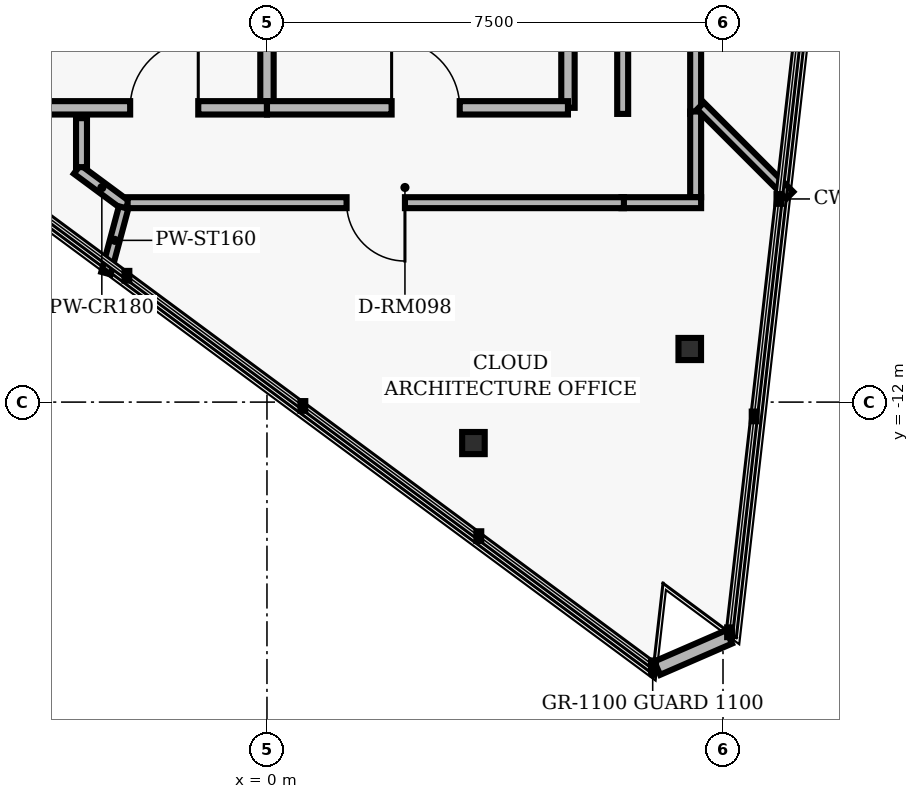
"""IFC4 building model, lengths in metres.
Left out: names, types, materials, properties, quantities, classifications, styles, units other than length and angle.
Written with IfcOpenShell. Run it as: python <this file> out.ifc"""

import sys

from ifc_helpers import new_model, si_unit, direction, frame, frame_2d, origin, origin_2d, place, context, subcontext, project, spatial, rectangle, i_section, extrude, element, fill, save


model = new_model("IFC4")
c1 = context("Model", 3, precision=1e-05, world=origin(), true_north=direction((0.0, 1.0)))
c2 = subcontext(c1, "Body", "Model", "MODEL_VIEW")
j1 = project(units=[si_unit("LENGTHUNIT", "METRE"), si_unit("PLANEANGLEUNIT", "RADIAN")], contexts=[c1])
p1 = place(None, origin())
s1 = spatial("IfcSite", under=j1, at=p1, CompositionType="ELEMENT")
p2 = place(p1, origin())
s2 = spatial("IfcBuilding", under=s1, at=p2, CompositionType="ELEMENT")
p3 = place(p2, frame((0.0, 0.0, 246.24)))
s3 = spatial("IfcBuildingStorey", under=s2, at=p3, CompositionType="ELEMENT", Elevation=246.24)
for number, where, z_axis, x_axis in (
    (1, (6.953, -11.127, 0.0), (0.0, 0.0, 1.0), (1.0, 0.0, 0.0)),
    (2, (3.396, -12.674, 0.0), (0.0, 0.0, 1.0), (1.0, 0.0, 0.0)),
):
    element("IfcColumn", number, at=place(p3, frame(where, z_axis=z_axis, x_axis=x_axis)), inside=s3, PredefinedType="COLUMN", context=c2, shape_type="SweptSolid", body=[
        extrude(i_section(OverallWidth=0.371, OverallDepth=0.364, WebThickness=0.013, FlangeThickness=0.022, FilletRadius=0.015, at=origin_2d()), origin(), (0.0, 0.0, 1.0), 2.88),
    ])
p4 = place(p3, frame((6.418, -16.376, 0.0), z_axis=(0.0, 0.0, 1.0), x_axis=(0.917064030228, 0.398739970986, 0.0)))
e3 = element("IfcWall", 3, at=p4, inside=s3, PredefinedType="PARAPET", context=c2, shape_type="SweptSolid", body=[
    extrude(rectangle(XDim=1.288, YDim=0.24, at=frame_2d((0.644, 0.0))), origin(), (0.0, 0.0, 1.0), 2.168),
])
p5 = place(p3, frame((4.95, -7.16, 0.0), z_axis=(0.0, 0.0, 1.0), x_axis=(0.0, 1.0, 0.0)))
e4 = element("IfcWall", 4, at=p5, inside=s3, PredefinedType="PARTITIONING", context=c2, shape_type="SweptSolid", body=[
    extrude(rectangle(XDim=2.71, YDim=0.22, at=frame_2d((1.355, 0.0))), origin(), (0.0, 0.0, 1.0), 2.623),
])
p6 = place(p3, frame((0.0, -7.16, 0.0), z_axis=(0.0, 0.0, 1.0), x_axis=(0.0, 1.0, 0.0)))
e5 = element("IfcWall", 5, at=p6, inside=s3, PredefinedType="PARTITIONING", context=c2, shape_type="SweptSolid", body=[
    extrude(rectangle(XDim=2.81, YDim=0.22, at=frame_2d((1.405, 0.0))), origin(), (0.0, 0.0, 1.0), 2.623),
])
p7 = place(p3, frame((-5.4, -7.16, 0.0), z_axis=(0.0, 0.0, 1.0), x_axis=(1.0, 0.0, 0.0)))
e6 = element("IfcWall", 6, at=p7, inside=s3, PredefinedType="PARTITIONING", context=c2, shape_type="SweptSolid", body=[
    extrude(rectangle(XDim=5.4, YDim=0.22, at=frame_2d((2.7, 0.0))), origin(), (0.0, 0.0, 1.0), 2.623),
])
p8 = place(p7, frame((3.15, 0.0, 0.0)))
e7 = element("IfcOpeningElement", 7, at=p8, cuts=e6, PredefinedType="OPENING", context=c2, shape_type="SweptSolid", body=[
    extrude(rectangle(XDim=1.12, YDim=2.02, at=frame_2d((0.56, 1.01))), frame((0.0, 0.12, 0.0), z_axis=(0.0, -1.0, 0.0), x_axis=(1.0, 0.0, 0.0)), (0.0, 0.0, 1.0), 0.24),
])
p9 = place(p3, frame((0.0, -7.16, 0.0), z_axis=(0.0, 0.0, 1.0), x_axis=(1.0, 0.0, 0.0)))
e8 = element("IfcWall", 8, at=p9, inside=s3, PredefinedType="PARTITIONING", context=c2, shape_type="SweptSolid", body=[
    extrude(rectangle(XDim=4.95, YDim=0.22, at=frame_2d((2.475, 0.0))), origin(), (0.0, 0.0, 1.0), 2.623),
])
p10 = place(p9, frame((2.05, 0.0, 0.0)))
e9 = element("IfcOpeningElement", 9, at=p10, cuts=e8, PredefinedType="OPENING", context=c2, shape_type="SweptSolid", body=[
    extrude(rectangle(XDim=1.12, YDim=2.02, at=frame_2d((0.56, 1.01))), frame((0.0, 0.12, 0.0), z_axis=(0.0, -1.0, 0.0), x_axis=(1.0, 0.0, 0.0)), (0.0, 0.0, 1.0), 0.24),
])
p11 = place(p3, frame((-2.309, -8.773, 0.0), z_axis=(0.0, 0.0, 1.0), x_axis=(-0.803864984235, 0.594811808155, 0.0)))
e10 = element("IfcWall", 10, at=p11, inside=s3, PredefinedType="PARTITIONING", context=c2, shape_type="SweptSolid", body=[
    extrude(rectangle(XDim=1.011, YDim=0.18, at=frame_2d((0.506, 0.0))), origin(), (0.0, 0.0, 1.0), 2.203),
])
p12 = place(p3, frame((-3.05, -8.135, 0.0), z_axis=(0.0, 0.0, 1.0), x_axis=(0.0, 1.0, 0.0)))
e11 = element("IfcWall", 11, at=p12, inside=s3, PredefinedType="PARTITIONING", context=c2, shape_type="SweptSolid", body=[
    extrude(rectangle(XDim=0.805, YDim=0.18, at=frame_2d((0.403, 0.0))), origin(), (0.0, 0.0, 1.0), 2.623),
])
p13 = place(p3, frame((5.85, -7.26, 0.0), z_axis=(0.0, 0.0, 1.0), x_axis=(0.0, 1.0, 0.0)))
e12 = element("IfcWall", 12, at=p13, inside=s3, PredefinedType="PARTITIONING", context=c2, shape_type="SweptSolid", body=[
    extrude(rectangle(XDim=2.61, YDim=0.18, at=frame_2d((1.305, 0.0))), origin(), (0.0, 0.0, 1.0), 2.153),
])
p14 = place(p3, frame((7.05, 7.22, 0.0), z_axis=(0.0, 0.0, 1.0), x_axis=(0.0, -1.0, 0.0)))
e13 = element("IfcWall", 13, at=p14, inside=s3, PredefinedType="PARTITIONING", context=c2, shape_type="SweptSolid", body=[
    extrude(rectangle(XDim=14.48, YDim=0.18, at=frame_2d((7.24, 0.0))), origin(), (0.0, 0.0, 1.0), 2.203),
])
p15 = place(p14, frame((12.019, 0.0, 0.0)))
e14 = element("IfcOpeningElement", 14, at=p15, cuts=e13, PredefinedType="OPENING", context=c2, shape_type="SweptSolid", body=[
    extrude(rectangle(XDim=1.02, YDim=2.02, at=frame_2d((0.51, 1.01))), frame((0.0, 0.1, 0.0), z_axis=(0.0, -1.0, 0.0), x_axis=(1.0, 0.0, 0.0)), (0.0, 0.0, 1.0), 0.2),
])
p16 = place(p14, frame((0.3, 0.0, 0.0)))
e15 = element("IfcOpeningElement", 15, at=p16, cuts=e13, PredefinedType="OPENING", context=c2, shape_type="SweptSolid", body=[
    extrude(rectangle(XDim=0.96, YDim=2.02, at=frame_2d((0.48, 1.01))), frame((0.0, 0.1, 0.0), z_axis=(0.0, -1.0, 0.0), x_axis=(1.0, 0.0, 0.0)), (0.0, 0.0, 1.0), 0.2),
])
p17 = place(p3, frame((7.05, -7.22, 0.0), z_axis=(0.0, 0.0, 1.0), x_axis=(0.0, -1.0, 0.0)))
e16 = element("IfcWall", 16, at=p17, inside=s3, PredefinedType="PARTITIONING", context=c2, shape_type="SweptSolid", body=[
    extrude(rectangle(XDim=1.41, YDim=0.18, at=frame_2d((0.705, 0.0))), origin(), (0.0, 0.0, 1.0), 2.153),
])
p18 = place(p3, frame((7.14, -8.72, 0.0), z_axis=(0.0, 0.0, 1.0), x_axis=(-1.0, 0.0, 0.0)))
e17 = element("IfcWall", 17, at=p18, inside=s3, PredefinedType="PARTITIONING", context=c2, shape_type="SweptSolid", body=[
    extrude(rectangle(XDim=1.31, YDim=0.18, at=frame_2d((0.655, 0.0))), origin(), (0.0, 0.0, 1.0), 2.623),
])
p19 = place(p3, frame((5.87, -8.72, 0.0), z_axis=(0.0, 0.0, 1.0), x_axis=(-1.0, 0.0, 0.0)))
e18 = element("IfcWall", 18, at=p19, inside=s3, PredefinedType="PARTITIONING", context=c2, shape_type="SweptSolid", body=[
    extrude(rectangle(XDim=8.162, YDim=0.18, at=frame_2d((4.081, 0.0))), origin(), (0.0, 0.0, 1.0), 2.623),
])
p20 = place(p19, frame((3.601, 0.0, 0.0)))
e19 = element("IfcOpeningElement", 19, at=p20, cuts=e18, PredefinedType="OPENING", context=c2, shape_type="SweptSolid", body=[
    extrude(rectangle(XDim=0.96, YDim=2.02, at=frame_2d((0.48, 1.01))), frame((0.0, 0.1, 0.0), z_axis=(0.0, -1.0, 0.0), x_axis=(1.0, 0.0, 0.0)), (0.0, 0.0, 1.0), 0.2),
])
p21 = place(p3, frame((-2.358, -8.8, 0.0), z_axis=(0.0, 0.0, 1.0), x_axis=(-0.258899893442, -0.965904159415, 0.0)))
e20 = element("IfcWall", 20, at=p21, inside=s3, PredefinedType="PARTITIONING", context=c2, shape_type="SweptSolid", body=[
    extrude(rectangle(XDim=1.117, YDim=0.16, at=frame_2d((0.559, 0.0))), origin(), (0.0, 0.0, 1.0), 2.623),
])
p22 = place(p3, frame((7.13, -7.13, 0.0), z_axis=(0.0, 0.0, 1.0), x_axis=(0.707106781187, -0.707106781187, 0.0)))
e21 = element("IfcWall", 21, at=p22, inside=s3, PredefinedType="PARTITIONING", context=c2, shape_type="SweptSolid", body=[
    extrude(rectangle(XDim=2.076, YDim=0.16, at=frame_2d((1.038, 0.0))), origin(), (0.0, 0.0, 1.0), 2.623),
])
p23 = place(p8, origin())
e22 = element("IfcDoor", 22, at=p23, inside=s3, OperationType="SINGLE_SWING_RIGHT", PredefinedType="DOOR", context=c2, shape_type="SweptSolid", body=[
    extrude(rectangle(XDim=1.12, YDim=2.02, at=frame_2d((0.56, 1.01))), frame((0.0, 0.025, 0.0), z_axis=(0.0, -1.0, 0.0), x_axis=(1.0, 0.0, 0.0)), (0.0, 0.0, 1.0), 0.05),
])
fill(e7, e22)
p24 = place(p10, origin())
e23 = element("IfcDoor", 23, at=p24, inside=s3, OperationType="SINGLE_SWING_LEFT", PredefinedType="DOOR", context=c2, shape_type="SweptSolid", body=[
    extrude(rectangle(XDim=1.12, YDim=2.02, at=frame_2d((0.56, 1.01))), frame((0.0, 0.025, 0.0), z_axis=(0.0, -1.0, 0.0), x_axis=(1.0, 0.0, 0.0)), (0.0, 0.0, 1.0), 0.05),
])
fill(e9, e23)
p25 = place(p20, origin())
e24 = element("IfcDoor", 24, at=p25, inside=s3, OperationType="SINGLE_SWING_LEFT", PredefinedType="DOOR", context=c2, shape_type="SweptSolid", body=[
    extrude(rectangle(XDim=0.96, YDim=2.02, at=frame_2d((0.48, 1.01))), frame((0.0, 0.025, 0.0), z_axis=(0.0, -1.0, 0.0), x_axis=(1.0, 0.0, 0.0)), (0.0, 0.0, 1.0), 0.05),
])
fill(e19, e24)
save(model, sys.argv[1])
